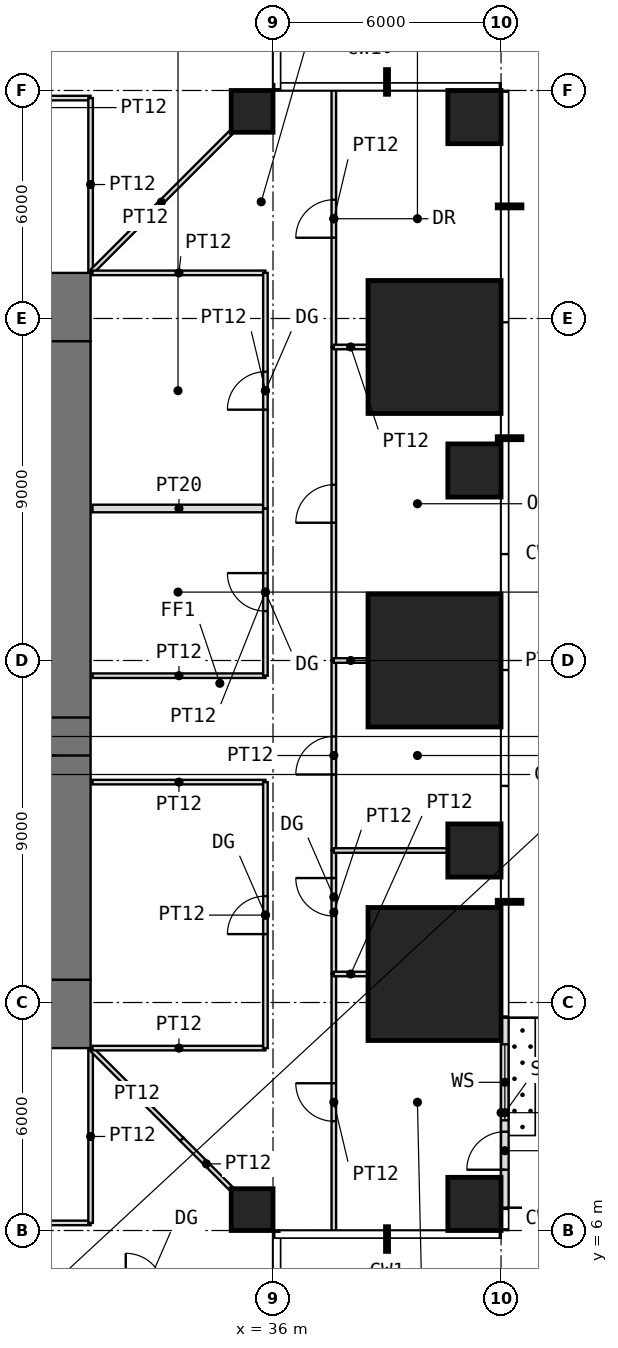
"""IFC4 building model, lengths in metres.
Left out: names, types, materials, properties, quantities, classifications, styles, units other than length and angle.
Written with IfcOpenShell. Run it as: python <this file> out.ifc"""

import sys

from ifc_helpers import new_model, si_unit, direction, frame, frame_2d, origin, origin_2d, place, context, subcontext, project, spatial, rectangle, extrude, element, fill, save


model = new_model("IFC4")
c1 = context("Model", 3, precision=1e-05, world=origin(), true_north=direction((0.0, 1.0)))
c2 = subcontext(c1, "Body", "Model", "MODEL_VIEW")
j1 = project(units=[si_unit("LENGTHUNIT", "METRE"), si_unit("PLANEANGLEUNIT", "RADIAN")], contexts=[c1])
p1 = place(None, origin())
s1 = spatial("IfcSite", under=j1, at=p1, CompositionType="ELEMENT")
p2 = place(p1, origin())
s2 = spatial("IfcBuilding", under=s1, at=p2, CompositionType="ELEMENT")
p3 = place(p2, frame((0.0, 0.0, 82.5)))
s3 = spatial("IfcBuildingStorey", under=s2, at=p3, CompositionType="ELEMENT", Elevation=82.5)
p4 = place(p3, frame((35.45, 6.55, 0.0), z_axis=(0.0, 0.0, 1.0), x_axis=(1.0, 0.0, 0.0)))
e1 = element("IfcColumn", 1, at=p4, inside=s3, PredefinedType="COLUMN", context=c2, shape_type="SweptSolid", body=[
    extrude(rectangle(XDim=1.1, YDim=1.1, at=origin_2d()), origin(), (0.0, 0.0, 1.0), 4.0),
])
p5 = place(p3, frame((41.3, 6.7, 0.0), z_axis=(0.0, 0.0, 1.0), x_axis=(1.0, 0.0, 0.0)))
e2 = element("IfcColumn", 2, at=p5, inside=s3, PredefinedType="COLUMN", context=c2, shape_type="SweptSolid", body=[
    extrude(rectangle(XDim=1.4, YDim=1.4, at=origin_2d()), origin(), (0.0, 0.0, 1.0), 4.0),
])
p6 = place(p3, frame((40.25, 12.75, 0.0), z_axis=(0.0, 0.0, 1.0), x_axis=(1.0, 0.0, 0.0)))
e3 = element("IfcColumn", 3, at=p6, inside=s3, PredefinedType="COLUMN", context=c2, shape_type="SweptSolid", body=[
    extrude(rectangle(XDim=3.5, YDim=3.5, at=origin_2d()), origin(), (0.0, 0.0, 1.0), 4.0),
])
p7 = place(p3, frame((41.3, 16.0, 0.0), z_axis=(0.0, 0.0, 1.0), x_axis=(1.0, 0.0, 0.0)))
e4 = element("IfcColumn", 4, at=p7, inside=s3, PredefinedType="COLUMN", context=c2, shape_type="SweptSolid", body=[
    extrude(rectangle(XDim=1.4, YDim=1.4, at=origin_2d()), origin(), (0.0, 0.0, 1.0), 4.0),
])
p8 = place(p3, frame((40.25, 21.0, 0.0), z_axis=(0.0, 0.0, 1.0), x_axis=(1.0, 0.0, 0.0)))
e5 = element("IfcColumn", 5, at=p8, inside=s3, PredefinedType="COLUMN", context=c2, shape_type="SweptSolid", body=[
    extrude(rectangle(XDim=3.5, YDim=3.5, at=origin_2d()), origin(), (0.0, 0.0, 1.0), 4.0),
])
p9 = place(p3, frame((41.3, 26.0, 0.0), z_axis=(0.0, 0.0, 1.0), x_axis=(1.0, 0.0, 0.0)))
e6 = element("IfcColumn", 6, at=p9, inside=s3, PredefinedType="COLUMN", context=c2, shape_type="SweptSolid", body=[
    extrude(rectangle(XDim=1.4, YDim=1.4, at=origin_2d()), origin(), (0.0, 0.0, 1.0), 4.0),
])
p10 = place(p3, frame((40.25, 29.25, 0.0), z_axis=(0.0, 0.0, 1.0), x_axis=(1.0, 0.0, 0.0)))
e7 = element("IfcColumn", 7, at=p10, inside=s3, PredefinedType="COLUMN", context=c2, shape_type="SweptSolid", body=[
    extrude(rectangle(XDim=3.5, YDim=3.5, at=origin_2d()), origin(), (0.0, 0.0, 1.0), 4.0),
])
p11 = place(p3, frame((35.45, 35.45, 0.0), z_axis=(0.0, 0.0, 1.0), x_axis=(1.0, 0.0, 0.0)))
e8 = element("IfcColumn", 8, at=p11, inside=s3, PredefinedType="COLUMN", context=c2, shape_type="SweptSolid", body=[
    extrude(rectangle(XDim=1.1, YDim=1.1, at=origin_2d()), origin(), (0.0, 0.0, 1.0), 4.0),
])
p12 = place(p3, frame((41.3, 35.3, 0.0), z_axis=(0.0, 0.0, 1.0), x_axis=(1.0, 0.0, 0.0)))
e9 = element("IfcColumn", 9, at=p12, inside=s3, PredefinedType="COLUMN", context=c2, shape_type="SweptSolid", body=[
    extrude(rectangle(XDim=1.4, YDim=1.4, at=origin_2d()), origin(), (0.0, 0.0, 1.0), 4.0),
])
p13 = place(p3, frame((42.1, 6.6, 0.0), z_axis=(0.0, 0.0, 1.0), x_axis=(0.0, 1.0, 0.0)))
e10 = element("IfcWall", 10, at=p13, inside=s3, PredefinedType="USERDEFINED", context=c2, shape_type="SweptSolid", body=[
    extrude(rectangle(XDim=5.0, YDim=0.2, at=frame_2d((2.5, 0.0))), origin(), (0.0, 0.0, 1.0), 3.55),
])
p14 = place(p13, frame((1.0, 0.0, 0.0)))
e11 = element("IfcOpeningElement", 11, at=p14, cuts=e10, PredefinedType="OPENING", context=c2, shape_type="SweptSolid", body=[
    extrude(rectangle(XDim=1.0, YDim=2.4, at=frame_2d((0.5, 1.2))), frame((0.0, 0.11, 0.0), z_axis=(0.0, -1.0, 0.0), x_axis=(1.0, 0.0, 0.0)), (0.0, 0.0, 1.0), 0.22),
])
p15 = place(p13, frame((2.3, 0.0, 0.3)))
e12 = element("IfcOpeningElement", 12, at=p15, cuts=e10, PredefinedType="OPENING", context=c2, shape_type="SweptSolid", body=[
    extrude(rectangle(XDim=2.0, YDim=2.7, at=frame_2d((1.0, 1.35))), frame((0.0, 0.11, 0.0), z_axis=(0.0, -1.0, 0.0), x_axis=(1.0, 0.0, 0.0)), (0.0, 0.0, 1.0), 0.22),
])
p16 = place(p3, frame((10.8, 11.7, -0.05), z_axis=(0.0, 0.0, 1.0), x_axis=(1.0, 0.0, 0.0)))
e13 = element("IfcWall", 13, at=p16, inside=s3, PredefinedType="SHEAR", context=c2, shape_type="SweptSolid", body=[
    extrude(rectangle(XDim=20.4, YDim=1.8, at=frame_2d((10.2, 0.0))), origin(), (0.0, 0.0, 1.0), 3.8),
])
p17 = place(p16, frame((9.2, 0.0, 0.05)))
e14 = element("IfcOpeningElement", 14, at=p17, cuts=e13, PredefinedType="OPENING", context=c2, shape_type="SweptSolid", body=[
    extrude(rectangle(XDim=2.0, YDim=2.2, at=frame_2d((1.0, 1.1))), frame((0.0, 0.91, 0.0), z_axis=(0.0, -1.0, 0.0), x_axis=(1.0, 0.0, 0.0)), (0.0, 0.0, 1.0), 1.82),
])
p18 = place(p3, frame((10.8, 30.3, -0.05), z_axis=(0.0, 0.0, 1.0), x_axis=(1.0, 0.0, 0.0)))
e15 = element("IfcWall", 15, at=p18, inside=s3, PredefinedType="SHEAR", context=c2, shape_type="SweptSolid", body=[
    extrude(rectangle(XDim=20.4, YDim=1.8, at=frame_2d((10.2, 0.0))), origin(), (0.0, 0.0, 1.0), 3.8),
])
p19 = place(p18, frame((9.2, 0.0, 0.05)))
e16 = element("IfcOpeningElement", 16, at=p19, cuts=e15, PredefinedType="OPENING", context=c2, shape_type="SweptSolid", body=[
    extrude(rectangle(XDim=2.0, YDim=2.2, at=frame_2d((1.0, 1.1))), frame((0.0, 0.91, 0.0), z_axis=(0.0, -1.0, 0.0), x_axis=(1.0, 0.0, 0.0)), (0.0, 0.0, 1.0), 1.82),
])
p20 = place(p3, frame((30.3, 12.6, -0.05), z_axis=(0.0, 0.0, 1.0), x_axis=(0.0, 1.0, 0.0)))
e17 = element("IfcWall", 17, at=p20, inside=s3, PredefinedType="SHEAR", context=c2, shape_type="SweptSolid", body=[
    extrude(rectangle(XDim=16.8, YDim=1.8, at=frame_2d((8.4, 0.0))), origin(), (0.0, 0.0, 1.0), 3.8),
])
p21 = place(p20, frame((5.9, 0.0, 0.05)))
e18 = element("IfcOpeningElement", 18, at=p21, cuts=e17, PredefinedType="OPENING", context=c2, shape_type="SweptSolid", body=[
    extrude(rectangle(XDim=1.0, YDim=2.2, at=frame_2d((0.5, 1.1))), frame((0.0, 0.91, 0.0), z_axis=(0.0, -1.0, 0.0), x_axis=(1.0, 0.0, 0.0)), (0.0, 0.0, 1.0), 1.82),
])
p22 = place(p3, frame((18.6, 6.2, 0.0), z_axis=(0.0, 0.0, 1.0), x_axis=(1.0, 0.0, 0.0)))
e19 = element("IfcWall", 19, at=p22, inside=s3, PredefinedType="PARTITIONING", context=c2, shape_type="SweptSolid", body=[
    extrude(rectangle(XDim=12.6, YDim=0.12, at=frame_2d((6.3, 0.0))), origin(), (0.0, 0.0, 1.0), 3.55),
])
p23 = place(p22, frame((8.1, 0.0, 0.0)))
e20 = element("IfcOpeningElement", 20, at=p23, cuts=e19, PredefinedType="OPENING", context=c2, shape_type="SweptSolid", body=[
    extrude(rectangle(XDim=1.0, YDim=2.4, at=frame_2d((0.5, 1.2))), frame((0.0, 0.07, 0.0), z_axis=(0.0, -1.0, 0.0), x_axis=(1.0, 0.0, 0.0)), (0.0, 0.0, 1.0), 0.14),
])
p24 = place(p3, frame((27.4, 35.8, 0.0), z_axis=(0.0, 0.0, 1.0), x_axis=(1.0, 0.0, 0.0)))
e21 = element("IfcWall", 21, at=p24, inside=s3, PredefinedType="PARTITIONING", context=c2, shape_type="SweptSolid", body=[
    extrude(rectangle(XDim=3.8, YDim=0.12, at=frame_2d((1.9, 0.0))), origin(), (0.0, 0.0, 1.0), 3.55),
])
p25 = place(p24, frame((1.4, 0.0, 0.0)))
e22 = element("IfcOpeningElement", 22, at=p25, cuts=e21, PredefinedType="OPENING", context=c2, shape_type="SweptSolid", body=[
    extrude(rectangle(XDim=1.0, YDim=2.4, at=frame_2d((0.5, 1.2))), frame((0.0, 0.07, 0.0), z_axis=(0.0, -1.0, 0.0), x_axis=(1.0, 0.0, 0.0)), (0.0, 0.0, 1.0), 0.14),
])
for number, where, z_axis, x_axis in (
    (23, (31.2, 6.2, 0.0), (0.0, 0.0, 1.0), (0.0, 1.0, 0.0)),
    (24, (31.2, 31.25, 0.0), (0.0, 0.0, 1.0), (0.0, 1.0, 0.0)),
):
    element("IfcWall", number, at=place(p3, frame(where, z_axis=z_axis, x_axis=x_axis)), inside=s3, PredefinedType="PARTITIONING", context=c2, shape_type="SweptSolid", body=[
        extrude(rectangle(XDim=4.55, YDim=0.12, at=frame_2d((2.275, 0.0))), origin(), (0.0, 0.0, 1.0), 3.55),
    ])
p26 = place(p3, frame((31.235, 10.765, 0.0), z_axis=(0.0, 0.0, 1.0), x_axis=(0.707106781187, -0.707106781187, 0.0)))
e25 = element("IfcWall", 25, at=p26, inside=s3, PredefinedType="PARTITIONING", context=c2, shape_type="SweptSolid", body=[
    extrude(rectangle(XDim=3.346, YDim=0.12, at=frame_2d((1.673, 0.0))), origin(), (0.0, 0.0, 1.0), 3.55),
])
p27 = place(p3, frame((31.235, 31.235, 0.0), z_axis=(0.0, 0.0, 1.0), x_axis=(0.707106781187, 0.707106781187, 0.0)))
e26 = element("IfcWall", 26, at=p27, inside=s3, PredefinedType="PARTITIONING", context=c2, shape_type="SweptSolid", body=[
    extrude(rectangle(XDim=5.168, YDim=0.12, at=frame_2d((2.584, 0.0))), origin(), (0.0, 0.0, 1.0), 3.55),
])
for number, where, z_axis, x_axis in (
    (27, (31.25, 10.8, 0.0), (0.0, 0.0, 1.0), (1.0, 0.0, 0.0)),
    (28, (31.25, 17.8, 0.0), (0.0, 0.0, 1.0), (1.0, 0.0, 0.0)),
    (29, (31.25, 20.6, 0.0), (0.0, 0.0, 1.0), (1.0, 0.0, 0.0)),
):
    element("IfcWall", number, at=place(p3, frame(where, z_axis=z_axis, x_axis=x_axis)), inside=s3, PredefinedType="PARTITIONING", context=c2, shape_type="SweptSolid", body=[
        extrude(rectangle(XDim=4.55, YDim=0.12, at=frame_2d((2.275, 0.0))), origin(), (0.0, 0.0, 1.0), 3.55),
    ])
p28 = place(p3, frame((31.25, 25.0, 0.0), z_axis=(0.0, 0.0, 1.0), x_axis=(1.0, 0.0, 0.0)))
e30 = element("IfcWall", 30, at=p28, inside=s3, PredefinedType="PARTITIONING", context=c2, shape_type="SweptSolid", body=[
    extrude(rectangle(XDim=4.55, YDim=0.2, at=frame_2d((2.275, 0.0))), origin(), (0.0, 0.0, 1.0), 3.55),
])
p29 = place(p3, frame((31.25, 31.2, 0.0), z_axis=(0.0, 0.0, 1.0), x_axis=(1.0, 0.0, 0.0)))
e31 = element("IfcWall", 31, at=p29, inside=s3, PredefinedType="PARTITIONING", context=c2, shape_type="SweptSolid", body=[
    extrude(rectangle(XDim=4.55, YDim=0.12, at=frame_2d((2.275, 0.0))), origin(), (0.0, 0.0, 1.0), 3.55),
])
p30 = place(p3, frame((33.602, 8.398, 0.0), z_axis=(0.0, 0.0, 1.0), x_axis=(0.707106781187, -0.707106781187, 0.0)))
e32 = element("IfcWall", 32, at=p30, inside=s3, PredefinedType="PARTITIONING", context=c2, shape_type="SweptSolid", body=[
    extrude(rectangle(XDim=1.822, YDim=0.12, at=frame_2d((0.911, 0.0))), origin(), (0.0, 0.0, 1.0), 3.55),
])
p31 = place(p3, frame((35.8, 10.8, 0.0), z_axis=(0.0, 0.0, 1.0), x_axis=(0.0, 1.0, 0.0)))
e33 = element("IfcWall", 33, at=p31, inside=s3, PredefinedType="PARTITIONING", context=c2, shape_type="SweptSolid", body=[
    extrude(rectangle(XDim=7.0, YDim=0.12, at=frame_2d((3.5, 0.0))), origin(), (0.0, 0.0, 1.0), 3.55),
])
p32 = place(p31, frame((3.0, 0.0, 0.0)))
e34 = element("IfcOpeningElement", 34, at=p32, cuts=e33, PredefinedType="OPENING", context=c2, shape_type="SweptSolid", body=[
    extrude(rectangle(XDim=1.0, YDim=2.4, at=frame_2d((0.5, 1.2))), frame((0.0, 0.07, 0.0), z_axis=(0.0, -1.0, 0.0), x_axis=(1.0, 0.0, 0.0)), (0.0, 0.0, 1.0), 0.14),
])
p33 = place(p3, frame((35.8, 20.6, 0.0), z_axis=(0.0, 0.0, 1.0), x_axis=(0.0, 1.0, 0.0)))
e35 = element("IfcWall", 35, at=p33, inside=s3, PredefinedType="PARTITIONING", context=c2, shape_type="SweptSolid", body=[
    extrude(rectangle(XDim=4.4, YDim=0.12, at=frame_2d((2.2, 0.0))), origin(), (0.0, 0.0, 1.0), 3.55),
])
p34 = place(p33, frame((1.7, 0.0, 0.0)))
e36 = element("IfcOpeningElement", 36, at=p34, cuts=e35, PredefinedType="OPENING", context=c2, shape_type="SweptSolid", body=[
    extrude(rectangle(XDim=1.0, YDim=2.4, at=frame_2d((0.5, 1.2))), frame((0.0, 0.07, 0.0), z_axis=(0.0, -1.0, 0.0), x_axis=(1.0, 0.0, 0.0)), (0.0, 0.0, 1.0), 0.14),
])
p35 = place(p3, frame((35.8, 25.0, 0.0), z_axis=(0.0, 0.0, 1.0), x_axis=(0.0, 1.0, 0.0)))
e37 = element("IfcWall", 37, at=p35, inside=s3, PredefinedType="PARTITIONING", context=c2, shape_type="SweptSolid", body=[
    extrude(rectangle(XDim=6.2, YDim=0.12, at=frame_2d((3.1, 0.0))), origin(), (0.0, 0.0, 1.0), 3.55),
])
p36 = place(p35, frame((2.6, 0.0, 0.0)))
e38 = element("IfcOpeningElement", 38, at=p36, cuts=e37, PredefinedType="OPENING", context=c2, shape_type="SweptSolid", body=[
    extrude(rectangle(XDim=1.0, YDim=2.4, at=frame_2d((0.5, 1.2))), frame((0.0, 0.07, 0.0), z_axis=(0.0, -1.0, 0.0), x_axis=(1.0, 0.0, 0.0)), (0.0, 0.0, 1.0), 0.14),
])
p37 = place(p3, frame((37.6, 6.0, 0.0), z_axis=(0.0, 0.0, 1.0), x_axis=(0.0, 1.0, 0.0)))
e39 = element("IfcWall", 39, at=p37, inside=s3, PredefinedType="PARTITIONING", context=c2, shape_type="SweptSolid", body=[
    extrude(rectangle(XDim=6.75, YDim=0.12, at=frame_2d((3.375, 0.0))), origin(), (0.0, 0.0, 1.0), 3.55),
])
p38 = place(p37, frame((2.875, 0.0, 0.0)))
e40 = element("IfcOpeningElement", 40, at=p38, cuts=e39, PredefinedType="OPENING", context=c2, shape_type="SweptSolid", body=[
    extrude(rectangle(XDim=1.0, YDim=2.2, at=frame_2d((0.5, 1.1))), frame((0.0, 0.07, 0.0), z_axis=(0.0, -1.0, 0.0), x_axis=(1.0, 0.0, 0.0)), (0.0, 0.0, 1.0), 0.14),
])
p39 = place(p3, frame((37.6, 12.75, 0.0), z_axis=(0.0, 0.0, 1.0), x_axis=(0.0, 1.0, 0.0)))
e41 = element("IfcWall", 41, at=p39, inside=s3, PredefinedType="PARTITIONING", context=c2, shape_type="SweptSolid", body=[
    extrude(rectangle(XDim=3.25, YDim=0.12, at=frame_2d((1.625, 0.0))), origin(), (0.0, 0.0, 1.0), 3.55),
])
p40 = place(p39, frame((1.525, 0.0, 0.0)))
e42 = element("IfcOpeningElement", 42, at=p40, cuts=e41, PredefinedType="OPENING", context=c2, shape_type="SweptSolid", body=[
    extrude(rectangle(XDim=1.0, YDim=2.4, at=frame_2d((0.5, 1.2))), frame((0.0, 0.07, 0.0), z_axis=(0.0, -1.0, 0.0), x_axis=(1.0, 0.0, 0.0)), (0.0, 0.0, 1.0), 0.14),
])
p41 = place(p3, frame((37.6, 12.75, 0.0), z_axis=(0.0, 0.0, 1.0), x_axis=(1.0, 0.0, 0.0)))
e43 = element("IfcWall", 43, at=p41, inside=s3, PredefinedType="PARTITIONING", context=c2, shape_type="SweptSolid", body=[
    extrude(rectangle(XDim=0.89, YDim=0.12, at=frame_2d((0.445, 0.0))), origin(), (0.0, 0.0, 1.0), 3.55),
])
p42 = place(p3, frame((37.6, 16.0, 0.0), z_axis=(0.0, 0.0, 1.0), x_axis=(0.0, 1.0, 0.0)))
e44 = element("IfcWall", 44, at=p42, inside=s3, PredefinedType="PARTITIONING", context=c2, shape_type="SweptSolid", body=[
    extrude(rectangle(XDim=5.0, YDim=0.12, at=frame_2d((2.5, 0.0))), origin(), (0.0, 0.0, 1.0), 3.55),
])
p43 = place(p42, frame((2.0, 0.0, 0.0)))
e45 = element("IfcOpeningElement", 45, at=p43, cuts=e44, PredefinedType="OPENING", context=c2, shape_type="SweptSolid", body=[
    extrude(rectangle(XDim=1.0, YDim=2.2, at=frame_2d((0.5, 1.1))), frame((0.0, 0.07, 0.0), z_axis=(0.0, -1.0, 0.0), x_axis=(1.0, 0.0, 0.0)), (0.0, 0.0, 1.0), 0.14),
])
p44 = place(p3, frame((37.6, 16.0, 0.0), z_axis=(0.0, 0.0, 1.0), x_axis=(1.0, 0.0, 0.0)))
e46 = element("IfcWall", 46, at=p44, inside=s3, PredefinedType="PARTITIONING", context=c2, shape_type="SweptSolid", body=[
    extrude(rectangle(XDim=2.99, YDim=0.12, at=frame_2d((1.495, 0.0))), origin(), (0.0, 0.0, 1.0), 2.736),
])
p45 = place(p3, frame((37.6, 21.0, 0.0), z_axis=(0.0, 0.0, 1.0), x_axis=(0.0, 1.0, 0.0)))
e47 = element("IfcWall", 47, at=p45, inside=s3, PredefinedType="PARTITIONING", context=c2, shape_type="SweptSolid", body=[
    extrude(rectangle(XDim=8.25, YDim=0.12, at=frame_2d((4.125, 0.0))), origin(), (0.0, 0.0, 1.0), 3.55),
])
p46 = place(p45, frame((3.625, 0.0, 0.0)))
e48 = element("IfcOpeningElement", 48, at=p46, cuts=e47, PredefinedType="OPENING", context=c2, shape_type="SweptSolid", body=[
    extrude(rectangle(XDim=1.0, YDim=2.4, at=frame_2d((0.5, 1.2))), frame((0.0, 0.07, 0.0), z_axis=(0.0, -1.0, 0.0), x_axis=(1.0, 0.0, 0.0)), (0.0, 0.0, 1.0), 0.14),
])
p47 = place(p3, frame((37.6, 21.0, 0.0), z_axis=(0.0, 0.0, 1.0), x_axis=(1.0, 0.0, 0.0)))
e49 = element("IfcWall", 49, at=p47, inside=s3, PredefinedType="PARTITIONING", context=c2, shape_type="SweptSolid", body=[
    extrude(rectangle(XDim=0.89, YDim=0.12, at=frame_2d((0.445, 0.0))), origin(), (0.0, 0.0, 1.0), 3.55),
])
p48 = place(p3, frame((37.6, 29.25, 0.0), z_axis=(0.0, 0.0, 1.0), x_axis=(0.0, 1.0, 0.0)))
e50 = element("IfcWall", 50, at=p48, inside=s3, PredefinedType="PARTITIONING", context=c2, shape_type="SweptSolid", body=[
    extrude(rectangle(XDim=6.75, YDim=0.12, at=frame_2d((3.375, 0.0))), origin(), (0.0, 0.0, 1.0), 3.55),
])
p49 = place(p48, frame((2.875, 0.0, 0.0)))
e51 = element("IfcOpeningElement", 51, at=p49, cuts=e50, PredefinedType="OPENING", context=c2, shape_type="SweptSolid", body=[
    extrude(rectangle(XDim=1.0, YDim=2.2, at=frame_2d((0.5, 1.1))), frame((0.0, 0.07, 0.0), z_axis=(0.0, -1.0, 0.0), x_axis=(1.0, 0.0, 0.0)), (0.0, 0.0, 1.0), 0.14),
])
p50 = place(p3, frame((37.6, 29.25, 0.0), z_axis=(0.0, 0.0, 1.0), x_axis=(1.0, 0.0, 0.0)))
e52 = element("IfcWall", 52, at=p50, inside=s3, PredefinedType="PARTITIONING", context=c2, shape_type="SweptSolid", body=[
    extrude(rectangle(XDim=0.89, YDim=0.12, at=frame_2d((0.445, 0.0))), origin(), (0.0, 0.0, 1.0), 3.55),
])
p51 = place(p14, origin())
e53 = element("IfcDoor", 53, at=p51, inside=s3, OperationType="SINGLE_SWING_LEFT", PredefinedType="DOOR", context=c2, shape_type="SweptSolid", body=[
    extrude(rectangle(XDim=1.0, YDim=2.4, at=frame_2d((0.5, 1.2))), frame((0.0, 0.025, 0.0), z_axis=(0.0, -1.0, 0.0), x_axis=(1.0, 0.0, 0.0)), (0.0, 0.0, 1.0), 0.05),
])
fill(e11, e53)
p52 = place(p15, origin())
e54 = element("IfcWindow", 54, at=p52, inside=s3, PartitioningType="SINGLE_PANEL", PredefinedType="WINDOW", context=c2, shape_type="SweptSolid", body=[
    extrude(rectangle(XDim=2.0, YDim=2.7, at=frame_2d((1.0, 1.35))), frame((0.0, 0.03, 0.0), z_axis=(0.0, -1.0, 0.0), x_axis=(1.0, 0.0, 0.0)), (0.0, 0.0, 1.0), 0.06),
])
fill(e12, e54)
p53 = place(p21, origin())
e55 = element("IfcDoor", 55, at=p53, inside=s3, OperationType="SINGLE_SWING_LEFT", PredefinedType="DOOR", context=c2, shape_type="SweptSolid", body=[
    extrude(rectangle(XDim=1.0, YDim=2.2, at=frame_2d((0.5, 1.1))), frame((0.0, 0.025, 0.0), z_axis=(0.0, -1.0, 0.0), x_axis=(1.0, 0.0, 0.0)), (0.0, 0.0, 1.0), 0.05),
])
fill(e18, e55)
p54 = place(p34, origin())
e56 = element("IfcDoor", 56, at=p54, inside=s3, OperationType="SINGLE_SWING_RIGHT", PredefinedType="DOOR", context=c2, shape_type="SweptSolid", body=[
    extrude(rectangle(XDim=1.0, YDim=2.4, at=frame_2d((0.5, 1.2))), frame((0.0, 0.025, 0.0), z_axis=(0.0, -1.0, 0.0), x_axis=(1.0, 0.0, 0.0)), (0.0, 0.0, 1.0), 0.05),
])
fill(e36, e56)
p55 = place(p36, origin())
e57 = element("IfcDoor", 57, at=p55, inside=s3, OperationType="SINGLE_SWING_LEFT", PredefinedType="DOOR", context=c2, shape_type="SweptSolid", body=[
    extrude(rectangle(XDim=1.0, YDim=2.4, at=frame_2d((0.5, 1.2))), frame((0.0, 0.025, 0.0), z_axis=(0.0, -1.0, 0.0), x_axis=(1.0, 0.0, 0.0)), (0.0, 0.0, 1.0), 0.05),
])
fill(e38, e57)
p56 = place(p38, origin())
e58 = element("IfcDoor", 58, at=p56, inside=s3, OperationType="SINGLE_SWING_RIGHT", PredefinedType="DOOR", context=c2, shape_type="SweptSolid", body=[
    extrude(rectangle(XDim=1.0, YDim=2.2, at=frame_2d((0.5, 1.1))), frame((0.0, 0.025, 0.0), z_axis=(0.0, -1.0, 0.0), x_axis=(1.0, 0.0, 0.0)), (0.0, 0.0, 1.0), 0.05),
])
fill(e40, e58)
p57 = place(p43, origin())
e59 = element("IfcDoor", 59, at=p57, inside=s3, OperationType="SINGLE_SWING_LEFT", PredefinedType="DOOR", context=c2, shape_type="SweptSolid", body=[
    extrude(rectangle(XDim=1.0, YDim=2.2, at=frame_2d((0.5, 1.1))), frame((0.0, 0.025, 0.0), z_axis=(0.0, -1.0, 0.0), x_axis=(1.0, 0.0, 0.0)), (0.0, 0.0, 1.0), 0.05),
])
fill(e45, e59)
p58 = place(p49, origin())
e60 = element("IfcDoor", 60, at=p58, inside=s3, OperationType="SINGLE_SWING_LEFT", PredefinedType="DOOR", context=c2, shape_type="SweptSolid", body=[
    extrude(rectangle(XDim=1.0, YDim=2.2, at=frame_2d((0.5, 1.1))), frame((0.0, 0.025, 0.0), z_axis=(0.0, -1.0, 0.0), x_axis=(1.0, 0.0, 0.0)), (0.0, 0.0, 1.0), 0.05),
])
fill(e51, e60)
p59 = place(p46, origin())
e61 = element("IfcDoor", 61, at=p59, inside=s3, OperationType="SINGLE_SWING_LEFT", PredefinedType="DOOR", context=c2, shape_type="SweptSolid", body=[
    extrude(rectangle(XDim=1.0, YDim=2.4, at=frame_2d((0.5, 1.2))), frame((0.0, 0.025, 0.0), z_axis=(0.0, -1.0, 0.0), x_axis=(1.0, 0.0, 0.0)), (0.0, 0.0, 1.0), 0.05),
])
fill(e48, e61)
p60 = place(p40, origin())
e62 = element("IfcDoor", 62, at=p60, inside=s3, OperationType="SINGLE_SWING_RIGHT", PredefinedType="DOOR", context=c2, shape_type="SweptSolid", body=[
    extrude(rectangle(XDim=1.0, YDim=2.4, at=frame_2d((0.5, 1.2))), frame((0.0, 0.025, 0.0), z_axis=(0.0, -1.0, 0.0), x_axis=(1.0, 0.0, 0.0)), (0.0, 0.0, 1.0), 0.05),
])
fill(e42, e62)
p61 = place(p32, origin())
e63 = element("IfcDoor", 63, at=p61, inside=s3, OperationType="SINGLE_SWING_LEFT", PredefinedType="DOOR", context=c2, shape_type="SweptSolid", body=[
    extrude(rectangle(XDim=1.0, YDim=2.4, at=frame_2d((0.5, 1.2))), frame((0.0, 0.025, 0.0), z_axis=(0.0, -1.0, 0.0), x_axis=(1.0, 0.0, 0.0)), (0.0, 0.0, 1.0), 0.05),
])
fill(e34, e63)
save(model, sys.argv[1])
